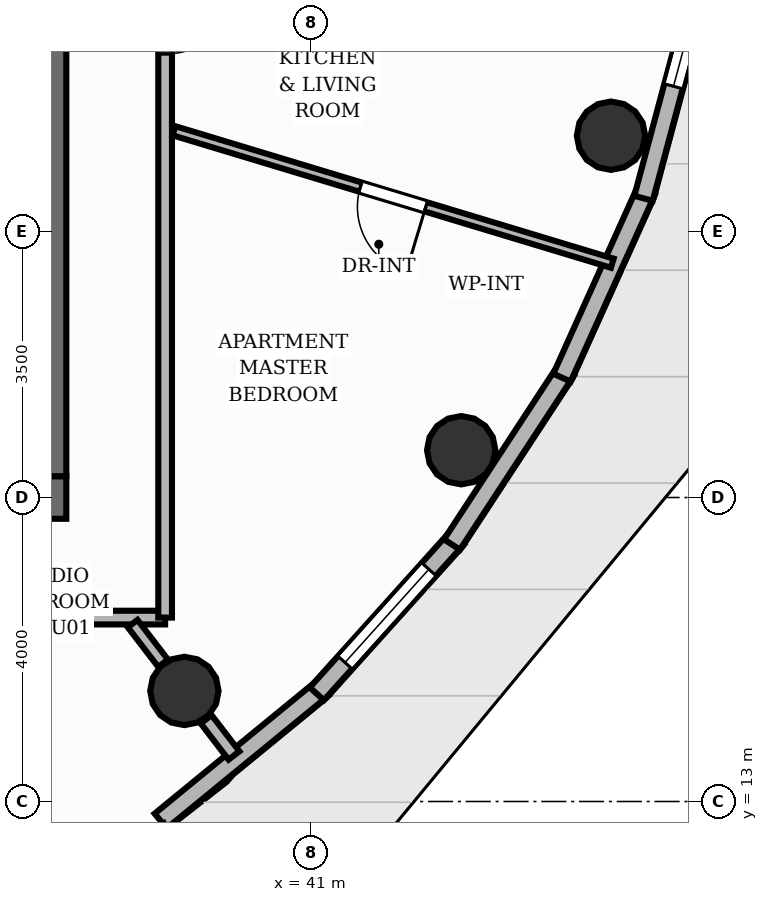
"""IFC4 building model, lengths in metres.
Left out: names, types, materials, properties, quantities, classifications, styles, units other than length and angle.
Written with IfcOpenShell. Run it as: python <this file> out.ifc"""

import sys

from ifc_helpers import new_model, si_unit, direction, frame, frame_2d, origin, origin_2d, place, context, subcontext, project, spatial, rectangle, circle, extrude, element, fill, save


model = new_model("IFC4")
c1 = context("Model", 3, precision=1e-05, world=origin(), true_north=direction((0.0, 1.0)))
c2 = subcontext(c1, "Body", "Model", "MODEL_VIEW")
j1 = project(units=[si_unit("LENGTHUNIT", "METRE"), si_unit("PLANEANGLEUNIT", "RADIAN")], contexts=[c1])
p1 = place(None, origin())
s1 = spatial("IfcSite", under=j1, at=p1, CompositionType="ELEMENT")
p2 = place(p1, origin())
s2 = spatial("IfcBuilding", under=s1, at=p2, CompositionType="ELEMENT")
p3 = place(p2, frame((0.0, 0.0, 179.04)))
s3 = spatial("IfcBuildingStorey", under=s2, at=p3, CompositionType="ELEMENT", Elevation=179.04)
p4 = place(p3, frame((26.22, 17.0, 0.0), z_axis=(0.0, 0.0, 1.0), x_axis=(1.0, 0.0, 0.0)))
e1 = element("IfcWall", 1, at=p4, inside=s3, PredefinedType="SHEAR", context=c2, shape_type="SweptSolid", body=[
    extrude(rectangle(XDim=11.56, YDim=0.56, at=frame_2d((5.78, 0.0))), origin(), (0.0, 0.0, 1.0), 3.2),
])
p5 = place(p4, frame((2.28, 0.0, 0.0)))
e2 = element("IfcOpeningElement", 2, at=p5, cuts=e1, PredefinedType="OPENING", context=c2, shape_type="SweptSolid", body=[
    extrude(rectangle(XDim=1.1, YDim=2.15, at=frame_2d((0.55, 1.075))), frame((0.0, 0.29, 0.0), z_axis=(0.0, -1.0, 0.0), x_axis=(1.0, 0.0, 0.0)), (0.0, 0.0, 1.0), 0.58),
])
p6 = place(p4, frame((5.83, 0.0, 0.0)))
e3 = element("IfcOpeningElement", 3, at=p6, cuts=e1, PredefinedType="OPENING", context=c2, shape_type="SweptSolid", body=[
    extrude(rectangle(XDim=0.9, YDim=2.1, at=frame_2d((0.45, 1.05))), frame((0.0, 0.29, 0.0), z_axis=(0.0, -1.0, 0.0), x_axis=(1.0, 0.0, 0.0)), (0.0, 0.0, 1.0), 0.58),
])
p7 = place(p3, frame((37.5, 17.28, 0.0), z_axis=(0.0, 0.0, 1.0), x_axis=(0.0, 1.0, 0.0)))
e4 = element("IfcWall", 4, at=p7, inside=s3, PredefinedType="SHEAR", context=c2, shape_type="SweptSolid", body=[
    extrude(rectangle(XDim=13.44, YDim=0.56, at=frame_2d((6.72, 0.0))), origin(), (0.0, 0.0, 1.0), 3.2),
])
for number, where, z_axis, x_axis in (
    (5, (39.333, 14.455, 0.0), (0.0, 0.0, 1.0), (1.0, 0.0, 0.0)),
    (6, (42.975, 17.622, 0.0), (0.0, 0.0, 1.0), (1.0, 0.0, 0.0)),
    (7, (44.946, 21.76, 0.0), (0.0, 0.0, 1.0), (1.0, 0.0, 0.0)),
):
    element("IfcColumn", number, at=place(p3, frame(where, z_axis=z_axis, x_axis=x_axis)), inside=s3, PredefinedType="COLUMN", context=c2, shape_type="SweptSolid", body=[
        extrude(circle(Radius=0.45, at=origin_2d()), origin(), (0.0, 0.0, 1.0), 3.2),
    ])
p8 = place(p3, frame((41.155, 14.492, 0.0), z_axis=(0.0, 0.0, 1.0), x_axis=(-0.773491700486, -0.633806428872, 0.0)))
e8 = element("IfcWall", 8, at=p8, inside=s3, PredefinedType="SOLIDWALL", context=c2, shape_type="SweptSolid", body=[
    extrude(rectangle(XDim=2.758, YDim=0.25, at=frame_2d((1.379, 0.0))), origin(), (0.0, 0.0, 1.0), 2.96),
])
p9 = place(p3, frame((42.921, 16.468, 0.0), z_axis=(0.0, 0.0, 1.0), x_axis=(-0.668764193685, -0.743474581438, 0.0)))
e9 = element("IfcWall", 9, at=p9, inside=s3, PredefinedType="SOLIDWALL", context=c2, shape_type="SweptSolid", body=[
    extrude(rectangle(XDim=2.758, YDim=0.25, at=frame_2d((1.379, 0.0))), origin(), (0.0, 0.0, 1.0), 2.96),
])
p10 = place(p9, frame((0.554, 0.0, 0.85)))
e10 = element("IfcOpeningElement", 10, at=p10, cuts=e9, PredefinedType="OPENING", context=c2, shape_type="SweptSolid", body=[
    extrude(rectangle(XDim=1.65, YDim=1.55, at=frame_2d((0.825, 0.775))), frame((0.0, 0.135, 0.0), z_axis=(0.0, -1.0, 0.0), x_axis=(1.0, 0.0, 0.0)), (0.0, 0.0, 1.0), 0.27),
])
p11 = place(p3, frame((44.354, 18.673, 0.0), z_axis=(0.0, 0.0, 1.0), x_axis=(-0.547664848596, -0.83669780304, 0.0)))
e11 = element("IfcWall", 11, at=p11, inside=s3, PredefinedType="SOLIDWALL", context=c2, shape_type="SweptSolid", body=[
    extrude(rectangle(XDim=2.739, YDim=0.25, at=frame_2d((1.369, 0.0))), origin(), (0.0, 0.0, 1.0), 2.96),
])
p12 = place(p3, frame((45.411, 21.04, 0.0), z_axis=(0.0, 0.0, 1.0), x_axis=(-0.410736648959, -0.911754026699, 0.0)))
e12 = element("IfcWall", 12, at=p12, inside=s3, PredefinedType="SOLIDWALL", context=c2, shape_type="SweptSolid", body=[
    extrude(rectangle(XDim=2.701, YDim=0.25, at=frame_2d((1.351, 0.0))), origin(), (0.0, 0.0, 1.0), 2.96),
])
p13 = place(p3, frame((46.06, 23.497, 0.0), z_axis=(0.0, 0.0, 1.0), x_axis=(-0.258688517816, -0.965960791518, 0.0)))
e13 = element("IfcWall", 13, at=p13, inside=s3, PredefinedType="SOLIDWALL", context=c2, shape_type="SweptSolid", body=[
    extrude(rectangle(XDim=2.651, YDim=0.25, at=frame_2d((1.326, 0.0))), origin(), (0.0, 0.0, 1.0), 2.96),
])
p14 = place(p13, frame((0.175, 0.0, 0.85)))
e14 = element("IfcOpeningElement", 14, at=p14, cuts=e13, PredefinedType="OPENING", context=c2, shape_type="SweptSolid", body=[
    extrude(rectangle(XDim=0.95, YDim=1.45, at=frame_2d((0.475, 0.725))), frame((0.0, 0.135, 0.0), z_axis=(0.0, -1.0, 0.0), x_axis=(1.0, 0.0, 0.0)), (0.0, 0.0, 1.0), 0.27),
])
p15 = place(p3, frame((39.62, 14.082, 0.0), z_axis=(0.0, 0.0, 1.0), x_axis=(0.609062571598, -0.793122174623, 0.0)))
e15 = element("IfcWall", 15, at=p15, inside=s3, PredefinedType="PARTITIONING", context=c2, shape_type="SweptSolid", body=[
    extrude(rectangle(XDim=0.601, YDim=0.18, at=frame_2d((0.3, 0.0))), origin(), (0.0, 0.0, 1.0), 2.403),
])
p16 = place(p3, frame((39.08, 15.42, 0.0), z_axis=(0.0, 0.0, 1.0), x_axis=(-1.0, 0.0, 0.0)))
e16 = element("IfcWall", 16, at=p16, inside=s3, PredefinedType="PARTITIONING", context=c2, shape_type="SweptSolid", body=[
    extrude(rectangle(XDim=5.88, YDim=0.18, at=frame_2d((2.94, 0.0))), origin(), (0.0, 0.0, 1.0), 2.955),
])
p17 = place(p16, frame((4.052, 0.0, 0.0)))
e17 = element("IfcOpeningElement", 17, at=p17, cuts=e16, PredefinedType="OPENING", context=c2, shape_type="SweptSolid", body=[
    extrude(rectangle(XDim=1.05, YDim=2.15, at=frame_2d((0.525, 1.075))), frame((0.0, 0.1, 0.0), z_axis=(0.0, -1.0, 0.0), x_axis=(1.0, 0.0, 0.0)), (0.0, 0.0, 1.0), 0.2),
])
p18 = place(p3, frame((39.08, 28.156, 0.0), z_axis=(0.0, 0.0, 1.0), x_axis=(0.0, -1.0, 0.0)))
e18 = element("IfcWall", 18, at=p18, inside=s3, PredefinedType="PARTITIONING", context=c2, shape_type="SweptSolid", body=[
    extrude(rectangle(XDim=12.736, YDim=0.18, at=frame_2d((6.368, 0.0))), origin(), (0.0, 0.0, 1.0), 2.955),
])
p19 = place(p18, frame((4.269, 0.0, 0.0)))
e19 = element("IfcOpeningElement", 19, at=p19, cuts=e18, PredefinedType="OPENING", context=c2, shape_type="SweptSolid", body=[
    extrude(rectangle(XDim=1.05, YDim=2.15, at=frame_2d((0.525, 1.075))), frame((0.0, 0.1, 0.0), z_axis=(0.0, -1.0, 0.0), x_axis=(1.0, 0.0, 0.0)), (0.0, 0.0, 1.0), 0.2),
])
p20 = place(p3, frame((38.653, 15.341, 0.0), z_axis=(0.0, 0.0, 1.0), x_axis=(0.609101063055, -0.79309261438, 0.0)))
e20 = element("IfcWall", 20, at=p20, inside=s3, PredefinedType="PLUMBINGWALL", context=c2, shape_type="SweptSolid", body=[
    extrude(rectangle(XDim=0.658, YDim=0.16, at=frame_2d((0.329, 0.0))), origin(), (0.0, 0.0, 1.0), 2.403),
])
p21 = place(p3, frame((44.963, 20.083, 0.0), z_axis=(0.0, 0.0, 1.0), x_axis=(-0.95726021897, 0.289228064298, 0.0)))
e21 = element("IfcWall", 21, at=p21, inside=s3, PredefinedType="PARTITIONING", context=c2, shape_type="SweptSolid", body=[
    extrude(rectangle(XDim=6.026, YDim=0.125, at=frame_2d((3.013, 0.0))), origin(), (0.0, 0.0, 1.0), 2.692),
])
p22 = place(p21, frame((2.563, 0.0, 0.0)))
e22 = element("IfcOpeningElement", 22, at=p22, cuts=e21, PredefinedType="OPENING", context=c2, shape_type="SweptSolid", body=[
    extrude(rectangle(XDim=0.9, YDim=2.1, at=frame_2d((0.45, 1.05))), frame((0.0, 0.073, 0.0), z_axis=(0.0, -1.0, 0.0), x_axis=(1.0, 0.0, 0.0)), (0.0, 0.0, 1.0), 0.145),
])
p23 = place(p10, origin())
e23 = element("IfcWindow", 23, at=p23, inside=s3, PartitioningType="SINGLE_PANEL", PredefinedType="WINDOW", context=c2, shape_type="SweptSolid", body=[
    extrude(rectangle(XDim=1.65, YDim=1.55, at=frame_2d((0.825, 0.775))), frame((0.0, 0.03, 0.0), z_axis=(0.0, -1.0, 0.0), x_axis=(1.0, 0.0, 0.0)), (0.0, 0.0, 1.0), 0.06),
])
fill(e10, e23)
p24 = place(p14, origin())
e24 = element("IfcWindow", 24, at=p24, inside=s3, PartitioningType="SINGLE_PANEL", PredefinedType="WINDOW", context=c2, shape_type="SweptSolid", body=[
    extrude(rectangle(XDim=0.95, YDim=1.45, at=frame_2d((0.475, 0.725))), frame((0.0, 0.03, 0.0), z_axis=(0.0, -1.0, 0.0), x_axis=(1.0, 0.0, 0.0)), (0.0, 0.0, 1.0), 0.06),
])
fill(e14, e24)
p25 = place(p19, origin())
e25 = element("IfcDoor", 25, at=p25, inside=s3, OperationType="SINGLE_SWING_LEFT", PredefinedType="DOOR", context=c2, shape_type="SweptSolid", body=[
    extrude(rectangle(XDim=1.05, YDim=2.15, at=frame_2d((0.525, 1.075))), frame((0.0, 0.025, 0.0), z_axis=(0.0, -1.0, 0.0), x_axis=(1.0, 0.0, 0.0)), (0.0, 0.0, 1.0), 0.05),
])
fill(e19, e25)
p26 = place(p22, origin())
e26 = element("IfcDoor", 26, at=p26, inside=s3, OperationType="SINGLE_SWING_LEFT", PredefinedType="DOOR", context=c2, shape_type="SweptSolid", body=[
    extrude(rectangle(XDim=0.9, YDim=2.1, at=frame_2d((0.45, 1.05))), frame((0.0, 0.025, 0.0), z_axis=(0.0, -1.0, 0.0), x_axis=(1.0, 0.0, 0.0)), (0.0, 0.0, 1.0), 0.05),
])
fill(e22, e26)
save(model, sys.argv[1])
